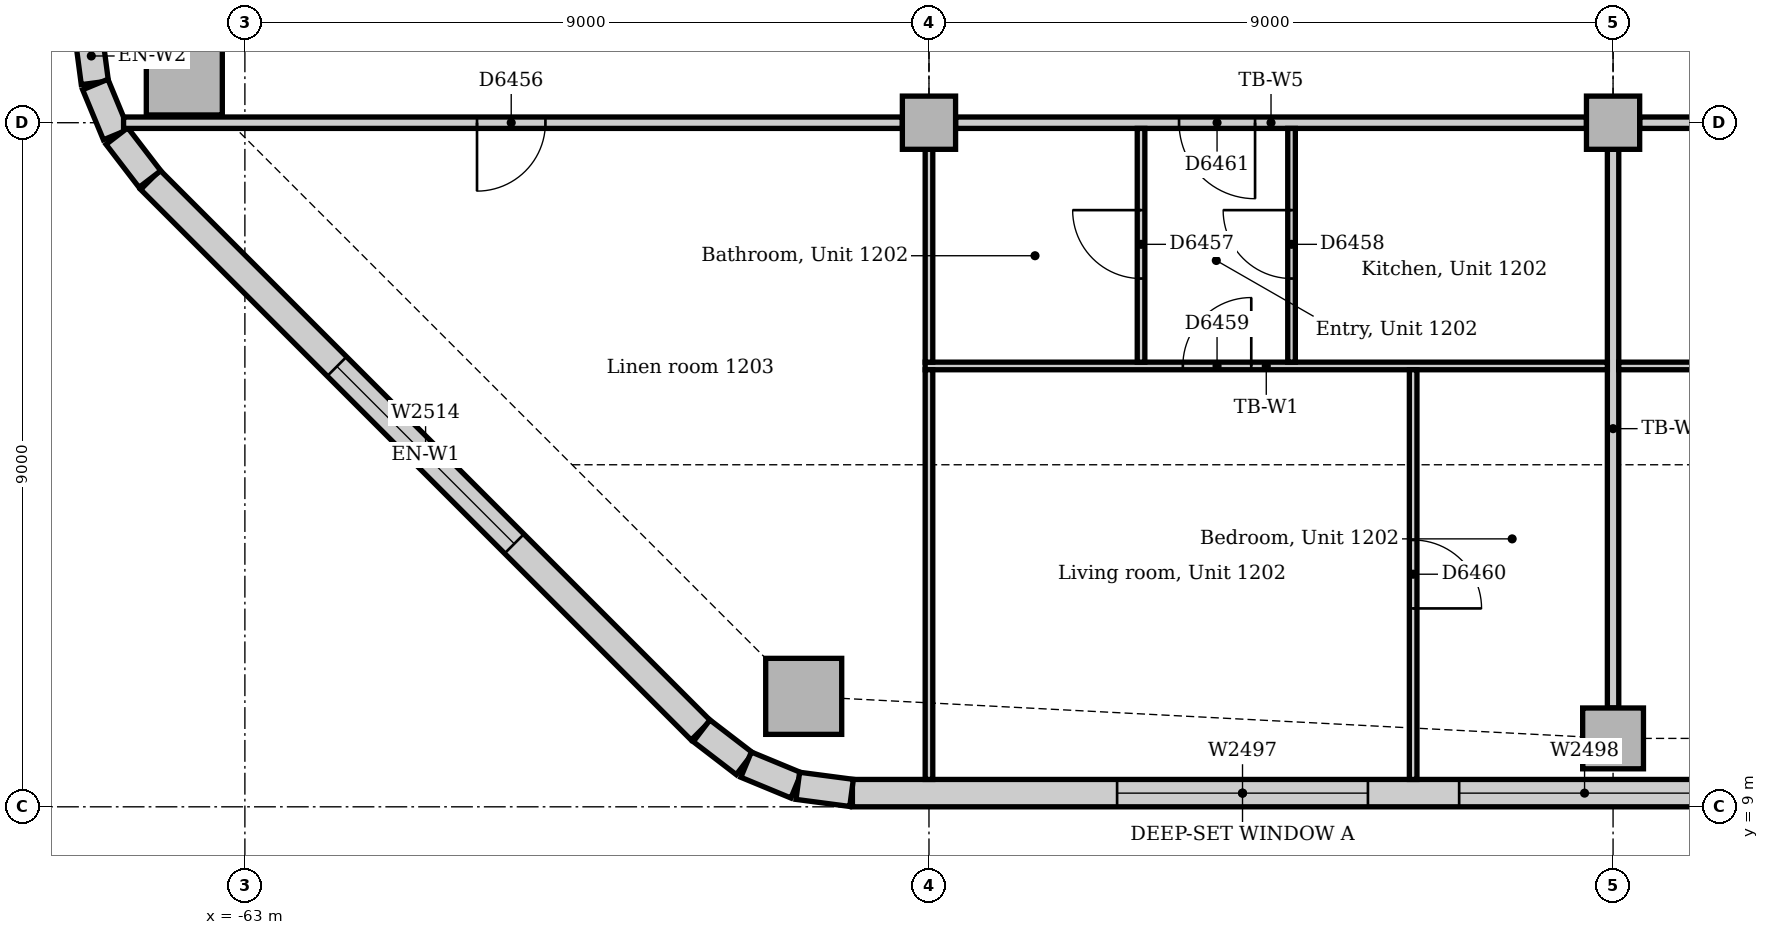
"""IFC4 building model, lengths in metres.
Left out: names, types, materials, properties, quantities, classifications, styles, units other than length and angle.
Written with IfcOpenShell. Run it as: python <this file> out.ifc"""

import sys

from ifc_helpers import new_model, si_unit, direction, frame, frame_2d, origin, origin_2d, place, context, subcontext, project, spatial, rectangle, extrude, element, fill, save


model = new_model("IFC4")
c1 = context("Model", 3, precision=1e-05, world=origin(), true_north=direction((0.0, 1.0)))
c2 = subcontext(c1, "Body", "Model", "MODEL_VIEW")
j1 = project(units=[si_unit("LENGTHUNIT", "METRE"), si_unit("PLANEANGLEUNIT", "RADIAN")], contexts=[c1])
p1 = place(None, origin())
s1 = spatial("IfcSite", under=j1, at=p1, CompositionType="ELEMENT")
p2 = place(p1, origin())
s2 = spatial("IfcBuilding", under=s1, at=p2, CompositionType="ELEMENT")
p3 = place(p2, frame((0.0, 0.0, 55.0)))
s3 = spatial("IfcBuildingStorey", under=s2, at=p3, CompositionType="ELEMENT", Elevation=55.0)
for number, where, z_axis, x_axis in (
    (1, (-55.648, 10.453, 0.0), (0.0, 0.0, 1.0), (1.0, 0.0, 0.0)),
    (2, (-63.797, 18.602, 0.0), (0.0, 0.0, 1.0), (1.0, 0.0, 0.0)),
):
    element("IfcColumn", number, at=place(p3, frame(where, z_axis=z_axis, x_axis=x_axis)), inside=s3, PredefinedType="COLUMN", context=c2, shape_type="SweptSolid", body=[
        extrude(rectangle(XDim=1.0, YDim=1.0, at=origin_2d()), origin(), (0.0, 0.0, 1.0), 3.85),
    ])
p4 = place(p3, frame((-45.0, 9.9, 0.0), z_axis=(0.0, 0.0, 1.0), x_axis=(1.0, 0.0, 0.0)))
e3 = element("IfcColumn", 3, at=p4, inside=s3, PredefinedType="COLUMN", context=c2, shape_type="SweptSolid", body=[
    extrude(rectangle(XDim=0.8, YDim=0.8, at=origin_2d()), origin(), (0.0, 0.0, 1.0), 3.85),
])
for number, where, z_axis, x_axis in (
    (4, (-54.0, 18.0, 0.0), (0.0, 0.0, 1.0), (1.0, 0.0, 0.0)),
    (5, (-45.0, 18.0, 0.0), (0.0, 0.0, 1.0), (1.0, 0.0, 0.0)),
):
    element("IfcColumn", number, at=place(p3, frame(where, z_axis=z_axis, x_axis=x_axis)), inside=s3, PredefinedType="COLUMN", context=c2, shape_type="SweptSolid", body=[
        extrude(rectangle(XDim=0.7, YDim=0.7, at=origin_2d()), origin(), (0.0, 0.0, 1.0), 3.85),
    ])
p5 = place(p3, frame((-55.007, 9.18, 0.0), z_axis=(0.0, 0.0, 1.0), x_axis=(1.0, 0.0, 0.0)))
e6 = element("IfcWall", 6, at=p5, inside=s3, PredefinedType="STANDARD", context=c2, shape_type="SweptSolid", body=[
    extrude(rectangle(XDim=23.765, YDim=0.36, at=frame_2d((11.882, 0.0))), origin(), (0.0, 0.0, 1.0), 3.85),
])
p6 = place(p5, frame((3.482, 0.0, 0.9)))
e7 = element("IfcOpeningElement", 7, at=p6, cuts=e6, PredefinedType="OPENING", context=c2, shape_type="SweptSolid", body=[
    extrude(rectangle(XDim=3.3, YDim=1.6, at=frame_2d((1.65, 0.8))), frame((0.0, 0.19, 0.0), z_axis=(0.0, -1.0, 0.0), x_axis=(1.0, 0.0, 0.0)), (0.0, 0.0, 1.0), 0.38),
])
p7 = place(p5, frame((7.982, 0.0, 0.9)))
e8 = element("IfcOpeningElement", 8, at=p7, cuts=e6, PredefinedType="OPENING", context=c2, shape_type="SweptSolid", body=[
    extrude(rectangle(XDim=3.3, YDim=1.6, at=frame_2d((1.65, 0.8))), frame((0.0, 0.19, 0.0), z_axis=(0.0, -1.0, 0.0), x_axis=(1.0, 0.0, 0.0)), (0.0, 0.0, 1.0), 0.38),
])
p8 = place(p5, frame((12.482, 0.0, 0.9)))
e9 = element("IfcOpeningElement", 9, at=p8, cuts=e6, PredefinedType="OPENING", context=c2, shape_type="SweptSolid", body=[
    extrude(rectangle(XDim=3.3, YDim=1.6, at=frame_2d((1.65, 0.8))), frame((0.0, 0.19, 0.0), z_axis=(0.0, -1.0, 0.0), x_axis=(1.0, 0.0, 0.0)), (0.0, 0.0, 1.0), 0.38),
])
p9 = place(p5, frame((16.982, 0.0, 0.9)))
e10 = element("IfcOpeningElement", 10, at=p9, cuts=e6, PredefinedType="OPENING", context=c2, shape_type="SweptSolid", body=[
    extrude(rectangle(XDim=3.3, YDim=1.6, at=frame_2d((1.65, 0.8))), frame((0.0, 0.19, 0.0), z_axis=(0.0, -1.0, 0.0), x_axis=(1.0, 0.0, 0.0)), (0.0, 0.0, 1.0), 0.38),
])
p10 = place(p5, frame((21.424, 0.0, 0.9)))
e11 = element("IfcOpeningElement", 11, at=p10, cuts=e6, PredefinedType="OPENING", context=c2, shape_type="SweptSolid", body=[
    extrude(rectangle(XDim=1.8, YDim=1.6, at=frame_2d((0.9, 0.8))), frame((0.0, 0.19, 0.0), z_axis=(0.0, -1.0, 0.0), x_axis=(1.0, 0.0, 0.0)), (0.0, 0.0, 1.0), 0.38),
])
p11 = place(p3, frame((-64.244, 17.249, 0.0), z_axis=(0.0, 0.0, 1.0), x_axis=(0.707106781187, -0.707106781187, 0.0)))
e12 = element("IfcWall", 12, at=p11, inside=s3, PredefinedType="STANDARD", context=c2, shape_type="SweptSolid", body=[
    extrude(rectangle(XDim=10.243, YDim=0.36, at=frame_2d((5.121, 0.0))), origin(), (0.0, 0.0, 1.0), 3.85),
])
p12 = place(p11, frame((3.471, 0.0, 0.9)))
e13 = element("IfcOpeningElement", 13, at=p12, cuts=e12, PredefinedType="OPENING", context=c2, shape_type="SweptSolid", body=[
    extrude(rectangle(XDim=3.3, YDim=1.6, at=frame_2d((1.65, 0.8))), frame((0.0, 0.19, 0.0), z_axis=(0.0, -1.0, 0.0), x_axis=(1.0, 0.0, 0.0)), (0.0, 0.0, 1.0), 0.38),
])
for number, where, z_axis, x_axis in (
    (14, (-65.067, 19.231, 0.0), (0.0, 0.0, 1.0), (0.131, -0.991, 0.0)),
    (15, (-64.968, 18.503, 0.0), (0.0, 0.0, 1.0), (0.383, -0.924, 0.0)),
):
    element("IfcWall", number, at=place(p3, frame(where, z_axis=z_axis, x_axis=x_axis)), inside=s3, PredefinedType="STANDARD", context=c2, shape_type="SweptSolid", body=[
        extrude(rectangle(XDim=0.713, YDim=0.36, at=frame_2d((0.356, 0.0))), origin(), (0.0, 0.0, 1.0), 3.85),
    ])
for number, where, z_axis, x_axis in (
    (16, (-64.684, 17.825, 0.0), (0.0, 0.0, 1.0), (0.609, -0.793, 0.0)),
    (17, (-56.991, 10.0, 0.0), (0.0, 0.0, 1.0), (0.793, -0.609, 0.0)),
):
    element("IfcWall", number, at=place(p3, frame(where, z_axis=z_axis, x_axis=x_axis)), inside=s3, PredefinedType="STANDARD", context=c2, shape_type="SweptSolid", body=[
        extrude(rectangle(XDim=0.713, YDim=0.36, at=frame_2d((0.357, 0.0))), origin(), (0.0, 0.0, 1.0), 3.85),
    ])
for number, where, z_axis, x_axis in (
    (18, (-56.406, 9.555, 0.0), (0.0, 0.0, 1.0), (0.924, -0.383, 0.0)),
    (19, (-55.726, 9.276, 0.0), (0.0, 0.0, 1.0), (0.991, -0.131, 0.0)),
):
    element("IfcWall", number, at=place(p3, frame(where, z_axis=z_axis, x_axis=x_axis)), inside=s3, PredefinedType="STANDARD", context=c2, shape_type="SweptSolid", body=[
        extrude(rectangle(XDim=0.713, YDim=0.36, at=frame_2d((0.356, 0.0))), origin(), (0.0, 0.0, 1.0), 3.85),
    ])
p13 = place(p3, frame((-44.65, 18.0, 0.0), z_axis=(0.0, 0.0, 1.0), x_axis=(1.0, 0.0, 0.0)))
e20 = element("IfcWall", 20, at=p13, inside=s3, PredefinedType="PARTITIONING", context=c2, shape_type="SweptSolid", body=[
    extrude(rectangle(XDim=8.3, YDim=0.15, at=frame_2d((4.15, 0.0))), origin(), (0.0, 0.0, 1.0), 3.158),
])
p14 = place(p13, frame((3.05, 0.0, 0.0)))
e21 = element("IfcOpeningElement", 21, at=p14, cuts=e20, PredefinedType="OPENING", context=c2, shape_type="SweptSolid", body=[
    extrude(rectangle(XDim=1.0, YDim=2.1, at=frame_2d((0.5, 1.05))), frame((0.0, 0.085, 0.0), z_axis=(0.0, -1.0, 0.0), x_axis=(1.0, 0.0, 0.0)), (0.0, 0.0, 1.0), 0.17),
])
p15 = place(p3, frame((-53.65, 18.0, 0.0), z_axis=(0.0, 0.0, 1.0), x_axis=(1.0, 0.0, 0.0)))
e22 = element("IfcWall", 22, at=p15, inside=s3, PredefinedType="PARTITIONING", context=c2, shape_type="SweptSolid", body=[
    extrude(rectangle(XDim=8.3, YDim=0.15, at=frame_2d((4.15, 0.0))), origin(), (0.0, 0.0, 1.0), 3.158),
])
p16 = place(p15, frame((2.94, 0.0, 0.0)))
e23 = element("IfcOpeningElement", 23, at=p16, cuts=e22, PredefinedType="OPENING", context=c2, shape_type="SweptSolid", body=[
    extrude(rectangle(XDim=1.0, YDim=2.1, at=frame_2d((0.5, 1.05))), frame((0.0, 0.085, 0.0), z_axis=(0.0, -1.0, 0.0), x_axis=(1.0, 0.0, 0.0)), (0.0, 0.0, 1.0), 0.17),
])
p17 = place(p3, frame((-64.596, 18.0, 0.0), z_axis=(0.0, 0.0, 1.0), x_axis=(1.0, 0.0, 0.0)))
e24 = element("IfcWall", 24, at=p17, inside=s3, PredefinedType="PARTITIONING", context=c2, shape_type="SweptSolid", body=[
    extrude(rectangle(XDim=10.246, YDim=0.15, at=frame_2d((5.123, 0.0))), origin(), (0.0, 0.0, 1.0), 3.158),
])
p18 = place(p17, frame((4.65, 0.0, 0.0)))
e25 = element("IfcOpeningElement", 25, at=p18, cuts=e24, PredefinedType="OPENING", context=c2, shape_type="SweptSolid", body=[
    extrude(rectangle(XDim=0.9, YDim=2.1, at=frame_2d((0.45, 1.05))), frame((0.0, 0.085, 0.0), z_axis=(0.0, -1.0, 0.0), x_axis=(1.0, 0.0, 0.0)), (0.0, 0.0, 1.0), 0.17),
])
p19 = place(p3, frame((-45.0, 10.3, 0.0), z_axis=(0.0, 0.0, 1.0), x_axis=(0.0, 1.0, 0.0)))
e26 = element("IfcWall", 26, at=p19, inside=s3, PredefinedType="PARTITIONING", context=c2, shape_type="SweptSolid", body=[
    extrude(rectangle(XDim=7.35, YDim=0.15, at=frame_2d((3.675, 0.0))), origin(), (0.0, 0.0, 1.0), 3.256),
])
p20 = place(p3, frame((-54.05, 14.8, 0.0), z_axis=(0.0, 0.0, 1.0), x_axis=(1.0, 0.0, 0.0)))
e27 = element("IfcWall", 27, at=p20, inside=s3, PredefinedType="PARTITIONING", context=c2, shape_type="SweptSolid", body=[
    extrude(rectangle(XDim=8.975, YDim=0.1, at=frame_2d((4.487, 0.0))), origin(), (0.0, 0.0, 1.0), 3.85),
])
p21 = place(p20, frame((3.39, 0.0, 0.0)))
e28 = element("IfcOpeningElement", 28, at=p21, cuts=e27, PredefinedType="OPENING", context=c2, shape_type="SweptSolid", body=[
    extrude(rectangle(XDim=0.9, YDim=2.1, at=frame_2d((0.45, 1.05))), frame((0.0, 0.06, 0.0), z_axis=(0.0, -1.0, 0.0), x_axis=(1.0, 0.0, 0.0)), (0.0, 0.0, 1.0), 0.12),
])
p22 = place(p3, frame((-44.925, 14.8, 0.0), z_axis=(0.0, 0.0, 1.0), x_axis=(1.0, 0.0, 0.0)))
e29 = element("IfcWall", 29, at=p22, inside=s3, PredefinedType="PARTITIONING", context=c2, shape_type="SweptSolid", body=[
    extrude(rectangle(XDim=8.85, YDim=0.1, at=frame_2d((4.425, 0.0))), origin(), (0.0, 0.0, 1.0), 3.85),
])
p23 = place(p22, frame((3.265, 0.0, 0.0)))
e30 = element("IfcOpeningElement", 30, at=p23, cuts=e29, PredefinedType="OPENING", context=c2, shape_type="SweptSolid", body=[
    extrude(rectangle(XDim=0.9, YDim=2.1, at=frame_2d((0.45, 1.05))), frame((0.0, 0.06, 0.0), z_axis=(0.0, -1.0, 0.0), x_axis=(1.0, 0.0, 0.0)), (0.0, 0.0, 1.0), 0.12),
])
p24 = place(p3, frame((-54.0, 9.36, 0.0), z_axis=(0.0, 0.0, 1.0), x_axis=(0.0, 1.0, 0.0)))
e31 = element("IfcWall", 31, at=p24, inside=s3, PredefinedType="PARTITIONING", context=c2, shape_type="SweptSolid", body=[
    extrude(rectangle(XDim=5.39, YDim=0.1, at=frame_2d((2.695, 0.0))), origin(), (0.0, 0.0, 1.0), 3.256),
])
p25 = place(p3, frame((-54.0, 14.85, 0.0), z_axis=(0.0, 0.0, 1.0), x_axis=(0.0, 1.0, 0.0)))
e32 = element("IfcWall", 32, at=p25, inside=s3, PredefinedType="PARTITIONING", context=c2, shape_type="SweptSolid", body=[
    extrude(rectangle(XDim=2.8, YDim=0.1, at=frame_2d((1.4, 0.0))), origin(), (0.0, 0.0, 1.0), 3.256),
])
p26 = place(p3, frame((-47.63, 9.36, 0.0), z_axis=(0.0, 0.0, 1.0), x_axis=(0.0, 1.0, 0.0)))
e33 = element("IfcWall", 33, at=p26, inside=s3, PredefinedType="PARTITIONING", context=c2, shape_type="SweptSolid", body=[
    extrude(rectangle(XDim=5.39, YDim=0.1, at=frame_2d((2.695, 0.0))), origin(), (0.0, 0.0, 1.0), 3.85),
])
p27 = place(p26, frame((2.25, 0.0, 0.0)))
e34 = element("IfcOpeningElement", 34, at=p27, cuts=e33, PredefinedType="OPENING", context=c2, shape_type="SweptSolid", body=[
    extrude(rectangle(XDim=0.9, YDim=2.1, at=frame_2d((0.45, 1.05))), frame((0.0, 0.06, 0.0), z_axis=(0.0, -1.0, 0.0), x_axis=(1.0, 0.0, 0.0)), (0.0, 0.0, 1.0), 0.12),
])
p28 = place(p3, frame((-51.21, 14.85, 0.0), z_axis=(0.0, 0.0, 1.0), x_axis=(0.0, 1.0, 0.0)))
e35 = element("IfcWall", 35, at=p28, inside=s3, PredefinedType="PARTITIONING", context=c2, shape_type="SweptSolid", body=[
    extrude(rectangle(XDim=3.075, YDim=0.1, at=frame_2d((1.538, 0.0))), origin(), (0.0, 0.0, 1.0), 3.85),
])
p29 = place(p28, frame((1.1, 0.0, 0.0)))
e36 = element("IfcOpeningElement", 36, at=p29, cuts=e35, PredefinedType="OPENING", context=c2, shape_type="SweptSolid", body=[
    extrude(rectangle(XDim=0.9, YDim=2.1, at=frame_2d((0.45, 1.05))), frame((0.0, 0.06, 0.0), z_axis=(0.0, -1.0, 0.0), x_axis=(1.0, 0.0, 0.0)), (0.0, 0.0, 1.0), 0.12),
])
p30 = place(p3, frame((-49.23, 14.85, 0.0), z_axis=(0.0, 0.0, 1.0), x_axis=(0.0, 1.0, 0.0)))
e37 = element("IfcWall", 37, at=p30, inside=s3, PredefinedType="PARTITIONING", context=c2, shape_type="SweptSolid", body=[
    extrude(rectangle(XDim=3.075, YDim=0.1, at=frame_2d((1.538, 0.0))), origin(), (0.0, 0.0, 1.0), 3.85),
])
p31 = place(p30, frame((1.1, 0.0, 0.0)))
e38 = element("IfcOpeningElement", 38, at=p31, cuts=e37, PredefinedType="OPENING", context=c2, shape_type="SweptSolid", body=[
    extrude(rectangle(XDim=0.9, YDim=2.1, at=frame_2d((0.45, 1.05))), frame((0.0, 0.06, 0.0), z_axis=(0.0, -1.0, 0.0), x_axis=(1.0, 0.0, 0.0)), (0.0, 0.0, 1.0), 0.12),
])
p32 = place(p6, origin())
e39 = element("IfcWindow", 39, at=p32, inside=s3, PartitioningType="SINGLE_PANEL", PredefinedType="WINDOW", context=c2, shape_type="SweptSolid", body=[
    extrude(rectangle(XDim=3.3, YDim=1.6, at=frame_2d((1.65, 0.8))), frame((0.0, 0.13, 0.0), z_axis=(0.0, -1.0, 0.0), x_axis=(1.0, 0.0, 0.0)), (0.0, 0.0, 1.0), 0.06),
])
fill(e7, e39)
p33 = place(p7, origin())
e40 = element("IfcWindow", 40, at=p33, inside=s3, PartitioningType="SINGLE_PANEL", PredefinedType="WINDOW", context=c2, shape_type="SweptSolid", body=[
    extrude(rectangle(XDim=3.3, YDim=1.6, at=frame_2d((1.65, 0.8))), frame((0.0, 0.13, 0.0), z_axis=(0.0, -1.0, 0.0), x_axis=(1.0, 0.0, 0.0)), (0.0, 0.0, 1.0), 0.06),
])
fill(e8, e40)
p34 = place(p12, origin())
e41 = element("IfcWindow", 41, at=p34, inside=s3, PartitioningType="SINGLE_PANEL", PredefinedType="WINDOW", context=c2, shape_type="SweptSolid", body=[
    extrude(rectangle(XDim=3.3, YDim=1.6, at=frame_2d((1.65, 0.8))), frame((0.0, 0.13, 0.0), z_axis=(0.0, -1.0, 0.0), x_axis=(1.0, 0.0, 0.0)), (0.0, 0.0, 1.0), 0.06),
])
fill(e13, e41)
p35 = place(p18, frame((0.9, 0.0, 0.0), z_axis=(0.0, 0.0, 1.0), x_axis=(-1.0, 0.0, 0.0)))
e42 = element("IfcDoor", 42, at=p35, inside=s3, OperationType="SINGLE_SWING_RIGHT", PredefinedType="DOOR", context=c2, shape_type="SweptSolid", body=[
    extrude(rectangle(XDim=0.9, YDim=2.1, at=frame_2d((0.45, 1.05))), frame((0.0, 0.025, 0.0), z_axis=(0.0, -1.0, 0.0), x_axis=(1.0, 0.0, 0.0)), (0.0, 0.0, 1.0), 0.05),
])
fill(e25, e42)
p36 = place(p29, origin())
e43 = element("IfcDoor", 43, at=p36, inside=s3, OperationType="SINGLE_SWING_RIGHT", PredefinedType="DOOR", context=c2, shape_type="SweptSolid", body=[
    extrude(rectangle(XDim=0.9, YDim=2.1, at=frame_2d((0.45, 1.05))), frame((0.0, 0.025, 0.0), z_axis=(0.0, -1.0, 0.0), x_axis=(1.0, 0.0, 0.0)), (0.0, 0.0, 1.0), 0.05),
])
fill(e36, e43)
p37 = place(p31, origin())
e44 = element("IfcDoor", 44, at=p37, inside=s3, OperationType="SINGLE_SWING_RIGHT", PredefinedType="DOOR", context=c2, shape_type="SweptSolid", body=[
    extrude(rectangle(XDim=0.9, YDim=2.1, at=frame_2d((0.45, 1.05))), frame((0.0, 0.025, 0.0), z_axis=(0.0, -1.0, 0.0), x_axis=(1.0, 0.0, 0.0)), (0.0, 0.0, 1.0), 0.05),
])
fill(e38, e44)
p38 = place(p21, origin())
e45 = element("IfcDoor", 45, at=p38, inside=s3, OperationType="SINGLE_SWING_RIGHT", PredefinedType="DOOR", context=c2, shape_type="SweptSolid", body=[
    extrude(rectangle(XDim=0.9, YDim=2.1, at=frame_2d((0.45, 1.05))), frame((0.0, 0.025, 0.0), z_axis=(0.0, -1.0, 0.0), x_axis=(1.0, 0.0, 0.0)), (0.0, 0.0, 1.0), 0.05),
])
fill(e28, e45)
p39 = place(p27, frame((0.9, 0.0, 0.0), z_axis=(0.0, 0.0, 1.0), x_axis=(-1.0, 0.0, 0.0)))
e46 = element("IfcDoor", 46, at=p39, inside=s3, OperationType="SINGLE_SWING_RIGHT", PredefinedType="DOOR", context=c2, shape_type="SweptSolid", body=[
    extrude(rectangle(XDim=0.9, YDim=2.1, at=frame_2d((0.45, 1.05))), frame((0.0, 0.025, 0.0), z_axis=(0.0, -1.0, 0.0), x_axis=(1.0, 0.0, 0.0)), (0.0, 0.0, 1.0), 0.05),
])
fill(e34, e46)
p40 = place(p16, frame((1.0, 0.0, 0.0), z_axis=(0.0, 0.0, 1.0), x_axis=(-1.0, 0.0, 0.0)))
e47 = element("IfcDoor", 47, at=p40, inside=s3, OperationType="SINGLE_SWING_LEFT", PredefinedType="DOOR", context=c2, shape_type="SweptSolid", body=[
    extrude(rectangle(XDim=1.0, YDim=2.1, at=frame_2d((0.5, 1.05))), frame((0.0, 0.025, 0.0), z_axis=(0.0, -1.0, 0.0), x_axis=(1.0, 0.0, 0.0)), (0.0, 0.0, 1.0), 0.05),
])
fill(e23, e47)
save(model, sys.argv[1])
